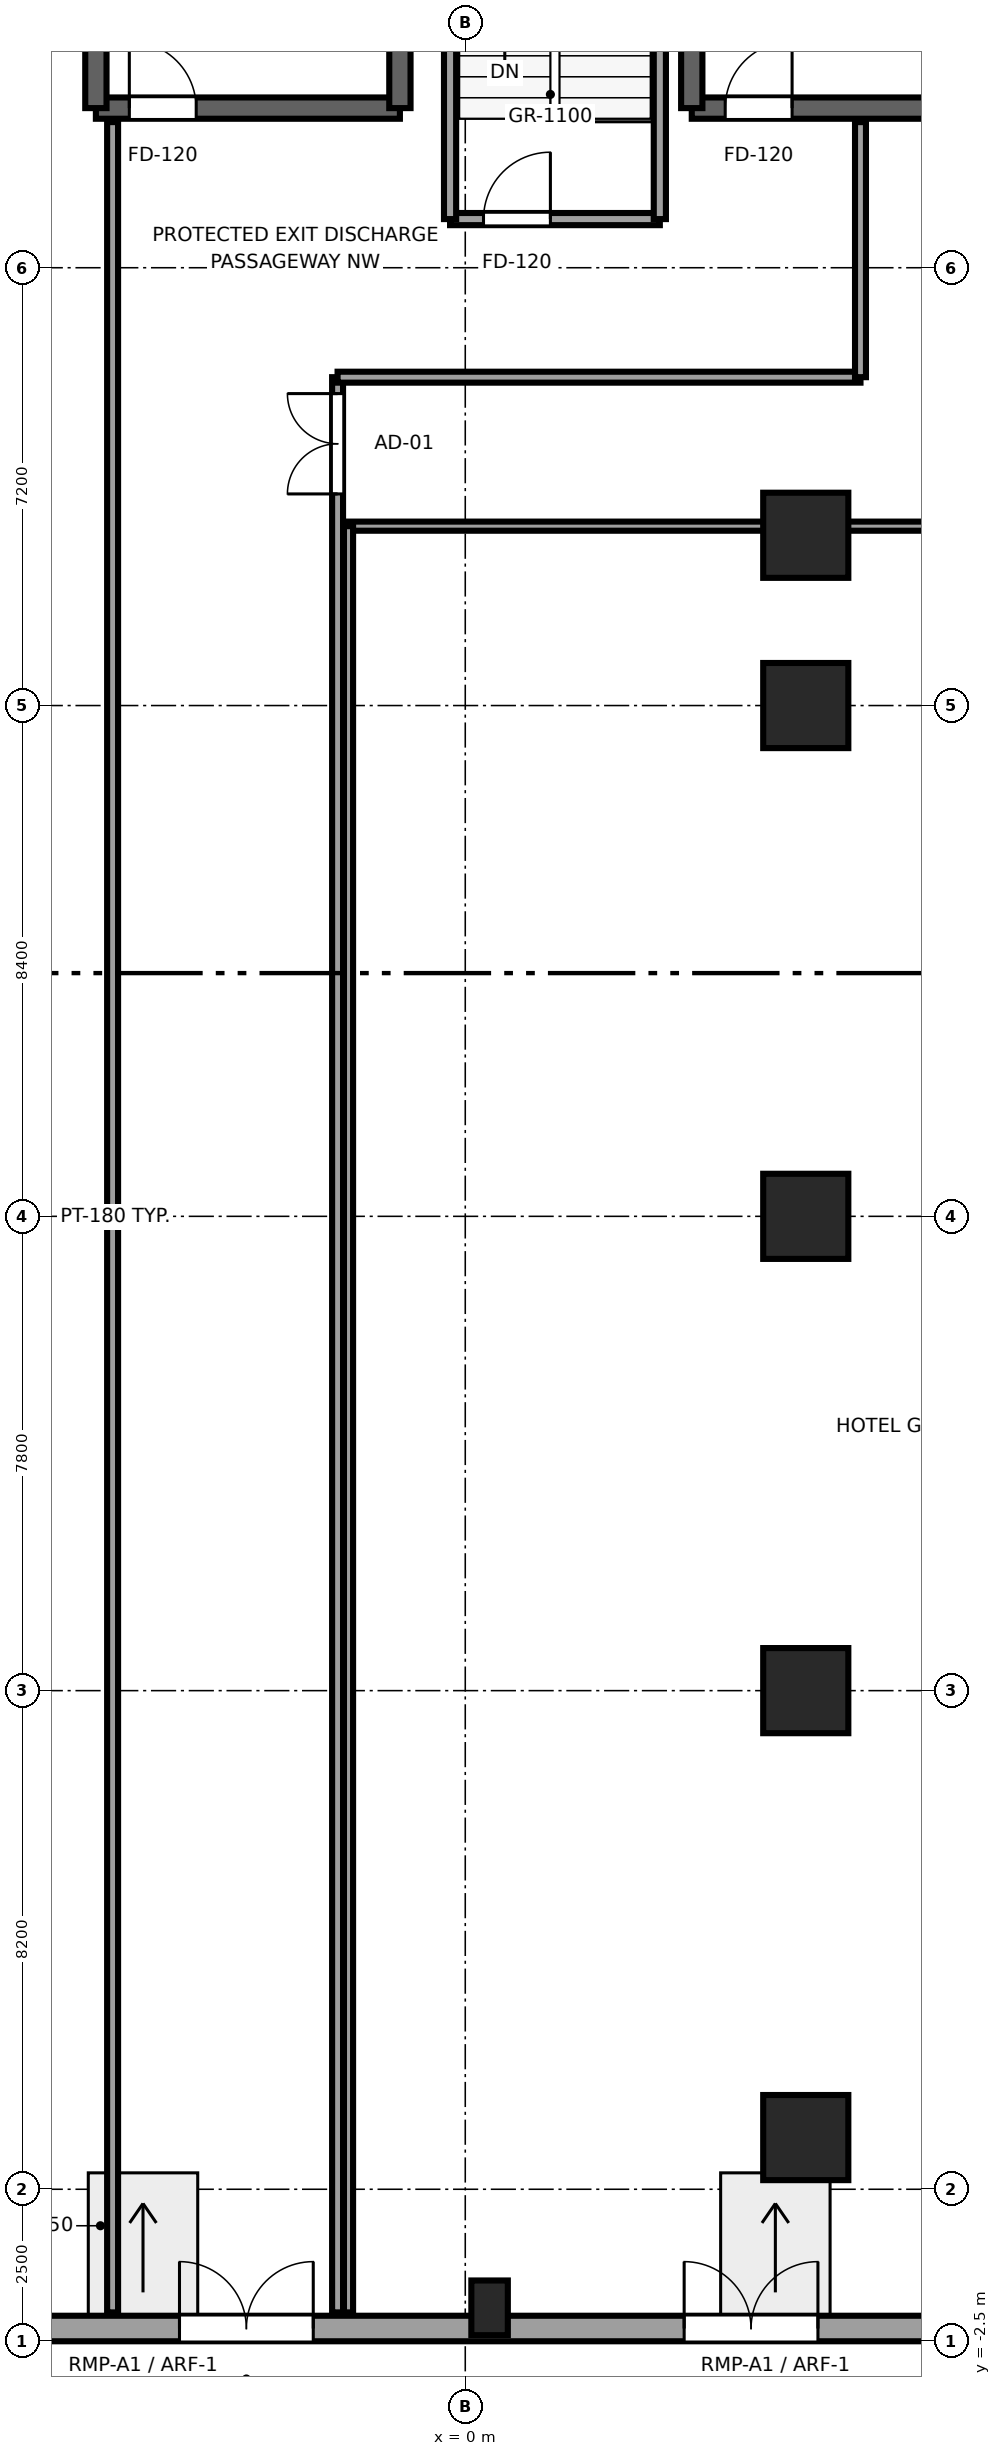
"""IFC4 building model, lengths in metres.
Left out: names, types, materials, properties, quantities, classifications, styles, units other than length and angle.
Written with IfcOpenShell. Run it as: python <this file> out.ifc"""

import sys

from ifc_helpers import new_model, si_unit, direction, frame, frame_2d, origin, origin_2d, place, context, subcontext, project, spatial, rectangle, extrude, source, transform, mapped, element, fill, save


model = new_model("IFC4")
c1 = context("Model", 3, precision=1e-05, world=origin(), true_north=direction((0.0, 1.0)))
c2 = subcontext(c1, "Body", "Model", "MODEL_VIEW")
j1 = project(units=[si_unit("LENGTHUNIT", "METRE"), si_unit("PLANEANGLEUNIT", "RADIAN")], contexts=[c1])
p1 = place(None, origin())
s1 = spatial("IfcSite", under=j1, at=p1, CompositionType="ELEMENT")
p2 = place(p1, origin())
s2 = spatial("IfcBuilding", under=s1, at=p2, CompositionType="ELEMENT")
p3 = place(p2, origin())
s3 = spatial("IfcBuildingStorey", under=s2, at=p3, CompositionType="ELEMENT", Elevation=0.0)
p4 = place(p3, frame((-6.075, 34.225, 0.0), z_axis=(0.0, 0.0, 1.0), x_axis=(1.0, 0.0, 0.0)))
e1 = element("IfcWall", 1, at=p4, inside=s3, PredefinedType="SHEAR", context=c2, shape_type="SweptSolid", body=[
    extrude(rectangle(XDim=5.0, YDim=0.35, at=frame_2d((2.5, 0.0))), origin(), (0.0, 0.0, 1.0), 6.0),
])
p5 = place(p4, frame((1.65, 0.0, 0.0), z_axis=(0.0, 0.0, 1.0), x_axis=(-1.0, 0.0, 0.0)))
e2 = element("IfcOpeningElement", 2, at=p5, cuts=e1, PredefinedType="OPENING", context=c2, shape_type="SweptSolid", body=[
    extrude(rectangle(XDim=1.1, YDim=2.12, at=frame_2d((0.55, 1.06))), frame((0.0, 0.185, 0.0), z_axis=(0.0, -1.0, 0.0), x_axis=(1.0, 0.0, 0.0)), (0.0, 0.0, 1.0), 0.37),
])
for number, where, z_axis, x_axis in (
    (3, (-1.075, 34.225, 0.0), (0.0, 0.0, 1.0), (0.0, 1.0, 0.0)),
    (4, (-6.075, 47.175, 0.0), (0.0, 0.0, 1.0), (0.0, -1.0, 0.0)),
):
    element("IfcWall", number, at=place(p3, frame(where, z_axis=z_axis, x_axis=x_axis)), inside=s3, PredefinedType="SHEAR", context=c2, shape_type="SweptSolid", body=[
        extrude(rectangle(XDim=12.95, YDim=0.35, at=frame_2d((6.475, 0.0))), origin(), (0.0, 0.0, 1.0), 6.0),
    ])
p6 = place(p3, frame((3.725, 34.225, 0.0), z_axis=(0.0, 0.0, 1.0), x_axis=(1.0, 0.0, 0.0)))
e5 = element("IfcWall", 5, at=p6, inside=s3, PredefinedType="SHEAR", context=c2, shape_type="SweptSolid", body=[
    extrude(rectangle(XDim=5.0, YDim=0.35, at=frame_2d((2.5, 0.0))), origin(), (0.0, 0.0, 1.0), 6.0),
])
p7 = place(p6, frame((1.65, 0.0, 0.0), z_axis=(0.0, 0.0, 1.0), x_axis=(-1.0, 0.0, 0.0)))
e6 = element("IfcOpeningElement", 6, at=p7, cuts=e5, PredefinedType="OPENING", context=c2, shape_type="SweptSolid", body=[
    extrude(rectangle(XDim=1.1, YDim=2.12, at=frame_2d((0.55, 1.06))), frame((0.0, 0.185, 0.0), z_axis=(0.0, -1.0, 0.0), x_axis=(1.0, 0.0, 0.0)), (0.0, 0.0, 1.0), 0.37),
])
p8 = place(p3, frame((3.725, 47.175, 0.0), z_axis=(0.0, 0.0, 1.0), x_axis=(0.0, -1.0, 0.0)))
e7 = element("IfcWall", 7, at=p8, inside=s3, PredefinedType="SHEAR", context=c2, shape_type="SweptSolid", body=[
    extrude(rectangle(XDim=12.95, YDim=0.35, at=frame_2d((6.475, 0.0))), origin(), (0.0, 0.0, 1.0), 6.0),
])
m1 = source(origin(), c2, "Body", "SweptSolid", [
    extrude(rectangle(XDim=1.4, YDim=1.4, at=origin_2d()), origin(), (0.0, 0.0, 1.0), 6.0),
])
for number, where, z_axis, x_axis in (
    (8, (5.6, 0.85, 0.0), (0.0, 0.0, 1.0), (1.0, 0.0, 0.0)),
    (9, (5.6, 8.2, 0.0), (0.0, 0.0, 1.0), (1.0, 0.0, 0.0)),
    (10, (5.6, 16.0, 0.0), (0.0, 0.0, 1.0), (1.0, 0.0, 0.0)),
    (11, (5.6, 24.4, 0.0), (0.0, 0.0, 1.0), (1.0, 0.0, 0.0)),
    (12, (5.6, 27.2, 0.0), (0.0, 0.0, 1.0), (1.0, 0.0, 0.0)),
):
    element("IfcColumn", number, at=place(p3, frame(where, z_axis=z_axis, x_axis=x_axis)), inside=s3, PredefinedType="COLUMN", context=c2, shape_type="MappedRepresentation", body=[
        mapped(m1, transform((0.0, 0.0, 0.0), x_axis=(1.0, 0.0, 0.0), y_axis=(0.0, 1.0, 0.0), z_axis=(0.0, 0.0, 1.0), scale=1.0)),
    ])
m2 = source(origin(), c2, "Body", "SweptSolid", [
    extrude(rectangle(XDim=0.6, YDim=0.9, at=origin_2d()), origin(), (0.0, 0.0, 1.0), 6.0),
])
p9 = place(p3, frame((0.4, -1.95, 0.0), z_axis=(0.0, 0.0, 1.0), x_axis=(1.0, 0.0, 0.0)))
e13 = element("IfcColumn", 13, at=p9, inside=s3, PredefinedType="PILASTER", context=c2, shape_type="MappedRepresentation", body=[
    mapped(m2, transform((0.0, 0.0, 0.0), x_axis=(1.0, 0.0, 0.0), y_axis=(0.0, 1.0, 0.0), z_axis=(0.0, 0.0, 1.0), scale=1.0)),
])
p10 = place(p3, frame((-8.19, -2.29, 0.0), z_axis=(0.0, 0.0, 1.0), x_axis=(1.0, 0.0, 0.0)))
e14 = element("IfcWall", 14, at=p10, inside=s3, PredefinedType="SOLIDWALL", context=c2, shape_type="SweptSolid", body=[
    extrude(rectangle(XDim=27.6, YDim=0.42, at=frame_2d((13.8, 0.0))), origin(), (0.0, 0.0, 1.0), 5.74),
])
p11 = place(p10, frame((5.69, 0.0, 0.0), z_axis=(0.0, 0.0, 1.0), x_axis=(-1.0, 0.0, 0.0)))
e15 = element("IfcOpeningElement", 15, at=p11, cuts=e14, PredefinedType="OPENING", context=c2, shape_type="SweptSolid", body=[
    extrude(rectangle(XDim=2.2, YDim=2.25, at=frame_2d((1.1, 1.125))), frame((0.0, 0.22, 0.0), z_axis=(0.0, -1.0, 0.0), x_axis=(1.0, 0.0, 0.0)), (0.0, 0.0, 1.0), 0.44),
])
p12 = place(p10, frame((13.99, 0.0, 0.0), z_axis=(0.0, 0.0, 1.0), x_axis=(-1.0, 0.0, 0.0)))
e16 = element("IfcOpeningElement", 16, at=p12, cuts=e14, PredefinedType="OPENING", context=c2, shape_type="SweptSolid", body=[
    extrude(rectangle(XDim=2.2, YDim=2.25, at=frame_2d((1.1, 1.125))), frame((0.0, 0.22, 0.0), z_axis=(0.0, -1.0, 0.0), x_axis=(1.0, 0.0, 0.0)), (0.0, 0.0, 1.0), 0.44),
])
p13 = place(p10, frame((23.09, 0.0, 0.0), z_axis=(0.0, 0.0, 1.0), x_axis=(-1.0, 0.0, 0.0)))
e17 = element("IfcOpeningElement", 17, at=p13, cuts=e14, PredefinedType="OPENING", context=c2, shape_type="SweptSolid", body=[
    extrude(rectangle(XDim=2.2, YDim=2.25, at=frame_2d((1.1, 1.125))), frame((0.0, 0.22, 0.0), z_axis=(0.0, -1.0, 0.0), x_axis=(1.0, 0.0, 0.0)), (0.0, 0.0, 1.0), 0.44),
])
p14 = place(p10, frame((23.41, 0.0, 0.65)))
e18 = element("IfcOpeningElement", 18, at=p14, cuts=e14, PredefinedType="OPENING", context=c2, shape_type="SweptSolid", body=[
    extrude(rectangle(XDim=3.0, YDim=2.5, at=frame_2d((1.5, 1.25))), frame((0.0, 0.22, 0.0), z_axis=(0.0, -1.0, 0.0), x_axis=(1.0, 0.0, 0.0)), (0.0, 0.0, 1.0), 0.44),
])
p15 = place(p3, frame((-0.25, 32.4, 0.0), z_axis=(0.0, 0.0, 1.0), x_axis=(1.0, 0.0, 0.0)))
e19 = element("IfcWall", 19, at=p15, inside=s3, PredefinedType="SOLIDWALL", context=c2, shape_type="SweptSolid", body=[
    extrude(rectangle(XDim=3.45, YDim=0.2, at=frame_2d((1.725, 0.0))), origin(), (0.0, 0.0, 1.0), 5.74),
])
p16 = place(p15, frame((1.65, 0.0, 0.0), z_axis=(0.0, 0.0, 1.0), x_axis=(-1.0, 0.0, 0.0)))
e20 = element("IfcOpeningElement", 20, at=p16, cuts=e19, PredefinedType="OPENING", context=c2, shape_type="SweptSolid", body=[
    extrude(rectangle(XDim=1.1, YDim=2.12, at=frame_2d((0.55, 1.06))), frame((0.0, 0.11, 0.0), z_axis=(0.0, -1.0, 0.0), x_axis=(1.0, 0.0, 0.0)), (0.0, 0.0, 1.0), 0.22),
])
for number, where, z_axis, x_axis in (
    (21, (3.2, 32.4, 0.0), (0.0, 0.0, 1.0), (0.0, 1.0, 0.0)),
    (22, (-0.25, 43.3, 0.0), (0.0, 0.0, 1.0), (0.0, -1.0, 0.0)),
):
    element("IfcWall", number, at=place(p3, frame(where, z_axis=z_axis, x_axis=x_axis)), inside=s3, PredefinedType="SOLIDWALL", context=c2, shape_type="SweptSolid", body=[
        extrude(rectangle(XDim=10.9, YDim=0.2, at=frame_2d((5.45, 0.0))), origin(), (0.0, 0.0, 1.0), 5.74),
    ])
p17 = place(p3, frame((-2.1, -2.025, 0.0), z_axis=(0.0, 0.0, 1.0), x_axis=(0.0, 1.0, 0.0)))
e23 = element("IfcWall", 23, at=p17, inside=s3, PredefinedType="PARTITIONING", context=c2, shape_type="SweptSolid", body=[
    extrude(rectangle(XDim=31.825, YDim=0.18, at=frame_2d((15.913, 0.0))), origin(), (0.0, 0.0, 1.0), 5.74),
])
p18 = place(p17, frame((29.905, 0.0, 0.0)))
e24 = element("IfcOpeningElement", 24, at=p18, cuts=e23, PredefinedType="OPENING", context=c2, shape_type="SweptSolid", body=[
    extrude(rectangle(XDim=1.65, YDim=2.15, at=frame_2d((0.825, 1.075))), frame((0.0, 0.1, 0.0), z_axis=(0.0, -1.0, 0.0), x_axis=(1.0, 0.0, 0.0)), (0.0, 0.0, 1.0), 0.2),
])
p19 = place(p3, frame((-2.1, 29.8, 0.0), z_axis=(0.0, 0.0, 1.0), x_axis=(1.0, 0.0, 0.0)))
e25 = element("IfcWall", 25, at=p19, inside=s3, PredefinedType="PARTITIONING", context=c2, shape_type="SweptSolid", body=[
    extrude(rectangle(XDim=8.6, YDim=0.18, at=frame_2d((4.3, 0.0))), origin(), (0.0, 0.0, 1.0), 4.53),
])
p20 = place(p3, frame((6.5, 29.8, 0.0), z_axis=(0.0, 0.0, 1.0), x_axis=(0.0, 1.0, 0.0)))
e26 = element("IfcWall", 26, at=p20, inside=s3, PredefinedType="PARTITIONING", context=c2, shape_type="SweptSolid", body=[
    extrude(rectangle(XDim=4.195, YDim=0.18, at=frame_2d((2.098, 0.0))), origin(), (0.0, 0.0, 1.0), 5.74),
])
p21 = place(p3, frame((-5.8, -2.025, 0.0), z_axis=(0.0, 0.0, 1.0), x_axis=(0.0, 1.0, 0.0)))
e27 = element("IfcWall", 27, at=p21, inside=s3, PredefinedType="PARTITIONING", context=c2, shape_type="SweptSolid", body=[
    extrude(rectangle(XDim=36.02, YDim=0.18, at=frame_2d((18.01, 0.0))), origin(), (0.0, 0.0, 1.0), 5.74),
])
p22 = place(p3, frame((-1.92, 27.35, 0.0), z_axis=(0.0, 0.0, 1.0), x_axis=(1.0, 0.0, 0.0)))
e28 = element("IfcWall", 28, at=p22, inside=s3, PredefinedType="PARTITIONING", context=c2, shape_type="SweptSolid", body=[
    extrude(rectangle(XDim=20.92, YDim=0.15, at=frame_2d((10.46, 0.0))), origin(), (0.0, 0.0, 1.0), 4.53),
])
p23 = place(p22, frame((9.635, 0.0, 0.0)))
e29 = element("IfcOpeningElement", 29, at=p23, cuts=e28, PredefinedType="OPENING", context=c2, shape_type="SweptSolid", body=[
    extrude(rectangle(XDim=1.65, YDim=2.15, at=frame_2d((0.825, 1.075))), frame((0.0, 0.085, 0.0), z_axis=(0.0, -1.0, 0.0), x_axis=(1.0, 0.0, 0.0)), (0.0, 0.0, 1.0), 0.17),
])
p24 = place(p3, frame((-1.92, -2.025, 0.0), z_axis=(0.0, 0.0, 1.0), x_axis=(0.0, 1.0, 0.0)))
e30 = element("IfcWall", 30, at=p24, inside=s3, PredefinedType="PARTITIONING", context=c2, shape_type="SweptSolid", body=[
    extrude(rectangle(XDim=29.375, YDim=0.15, at=frame_2d((14.688, 0.0))), origin(), (0.0, 0.0, 1.0), 5.74),
])
m3 = source(origin(), c2, "Body", "SweptSolid", [
    extrude(rectangle(XDim=2.2, YDim=2.25, at=frame_2d((1.1, 1.125))), frame((0.0, 0.025, 0.0), z_axis=(0.0, -1.0, 0.0), x_axis=(1.0, 0.0, 0.0)), (0.0, 0.0, 1.0), 0.05),
])
p25 = place(p11, origin())
e31 = element("IfcDoor", 31, at=p25, inside=s3, OperationType="DOUBLE_DOOR_SINGLE_SWING", PredefinedType="DOOR", context=c2, shape_type="MappedRepresentation", body=[
    mapped(m3, transform((0.0, 0.0, 0.0), x_axis=(1.0, 0.0, 0.0), y_axis=(0.0, 1.0, 0.0), z_axis=(0.0, 0.0, 1.0), scale=1.0)),
])
fill(e15, e31)
p26 = place(p12, origin())
e32 = element("IfcDoor", 32, at=p26, inside=s3, OperationType="DOUBLE_DOOR_SINGLE_SWING", PredefinedType="DOOR", context=c2, shape_type="MappedRepresentation", body=[
    mapped(m3, transform((0.0, 0.0, 0.0), x_axis=(1.0, 0.0, 0.0), y_axis=(0.0, 1.0, 0.0), z_axis=(0.0, 0.0, 1.0), scale=1.0)),
])
fill(e16, e32)
m4 = source(origin(), c2, "Body", "SweptSolid", [
    extrude(rectangle(XDim=1.1, YDim=2.12, at=frame_2d((0.55, 1.06))), frame((0.0, 0.025, 0.0), z_axis=(0.0, -1.0, 0.0), x_axis=(1.0, 0.0, 0.0)), (0.0, 0.0, 1.0), 0.05),
])
p27 = place(p16, origin())
e33 = element("IfcDoor", 33, at=p27, inside=s3, OperationType="SINGLE_SWING_RIGHT", PredefinedType="DOOR", context=c2, shape_type="MappedRepresentation", body=[
    mapped(m4, transform((0.0, 0.0, 0.0), x_axis=(1.0, 0.0, 0.0), y_axis=(0.0, 1.0, 0.0), z_axis=(0.0, 0.0, 1.0), scale=1.0)),
])
fill(e20, e33)
p28 = place(p5, origin())
e34 = element("IfcDoor", 34, at=p28, inside=s3, OperationType="SINGLE_SWING_LEFT", PredefinedType="DOOR", context=c2, shape_type="MappedRepresentation", body=[
    mapped(m4, transform((0.0, 0.0, 0.0), x_axis=(1.0, 0.0, 0.0), y_axis=(0.0, 1.0, 0.0), z_axis=(0.0, 0.0, 1.0), scale=1.0)),
])
fill(e2, e34)
p29 = place(p7, origin())
e35 = element("IfcDoor", 35, at=p29, inside=s3, OperationType="SINGLE_SWING_RIGHT", PredefinedType="DOOR", context=c2, shape_type="MappedRepresentation", body=[
    mapped(m4, transform((0.0, 0.0, 0.0), x_axis=(1.0, 0.0, 0.0), y_axis=(0.0, 1.0, 0.0), z_axis=(0.0, 0.0, 1.0), scale=1.0)),
])
fill(e6, e35)
m5 = source(origin(), c2, "Body", "SweptSolid", [
    extrude(rectangle(XDim=1.65, YDim=2.15, at=frame_2d((0.825, 1.075))), frame((0.0, 0.025, 0.0), z_axis=(0.0, -1.0, 0.0), x_axis=(1.0, 0.0, 0.0)), (0.0, 0.0, 1.0), 0.05),
])
p30 = place(p18, origin())
e36 = element("IfcDoor", 36, at=p30, inside=s3, OperationType="DOUBLE_DOOR_SINGLE_SWING", PredefinedType="DOOR", context=c2, shape_type="MappedRepresentation", body=[
    mapped(m5, transform((0.0, 0.0, 0.0), x_axis=(1.0, 0.0, 0.0), y_axis=(0.0, 1.0, 0.0), z_axis=(0.0, 0.0, 1.0), scale=1.0)),
])
fill(e24, e36)
save(model, sys.argv[1])
